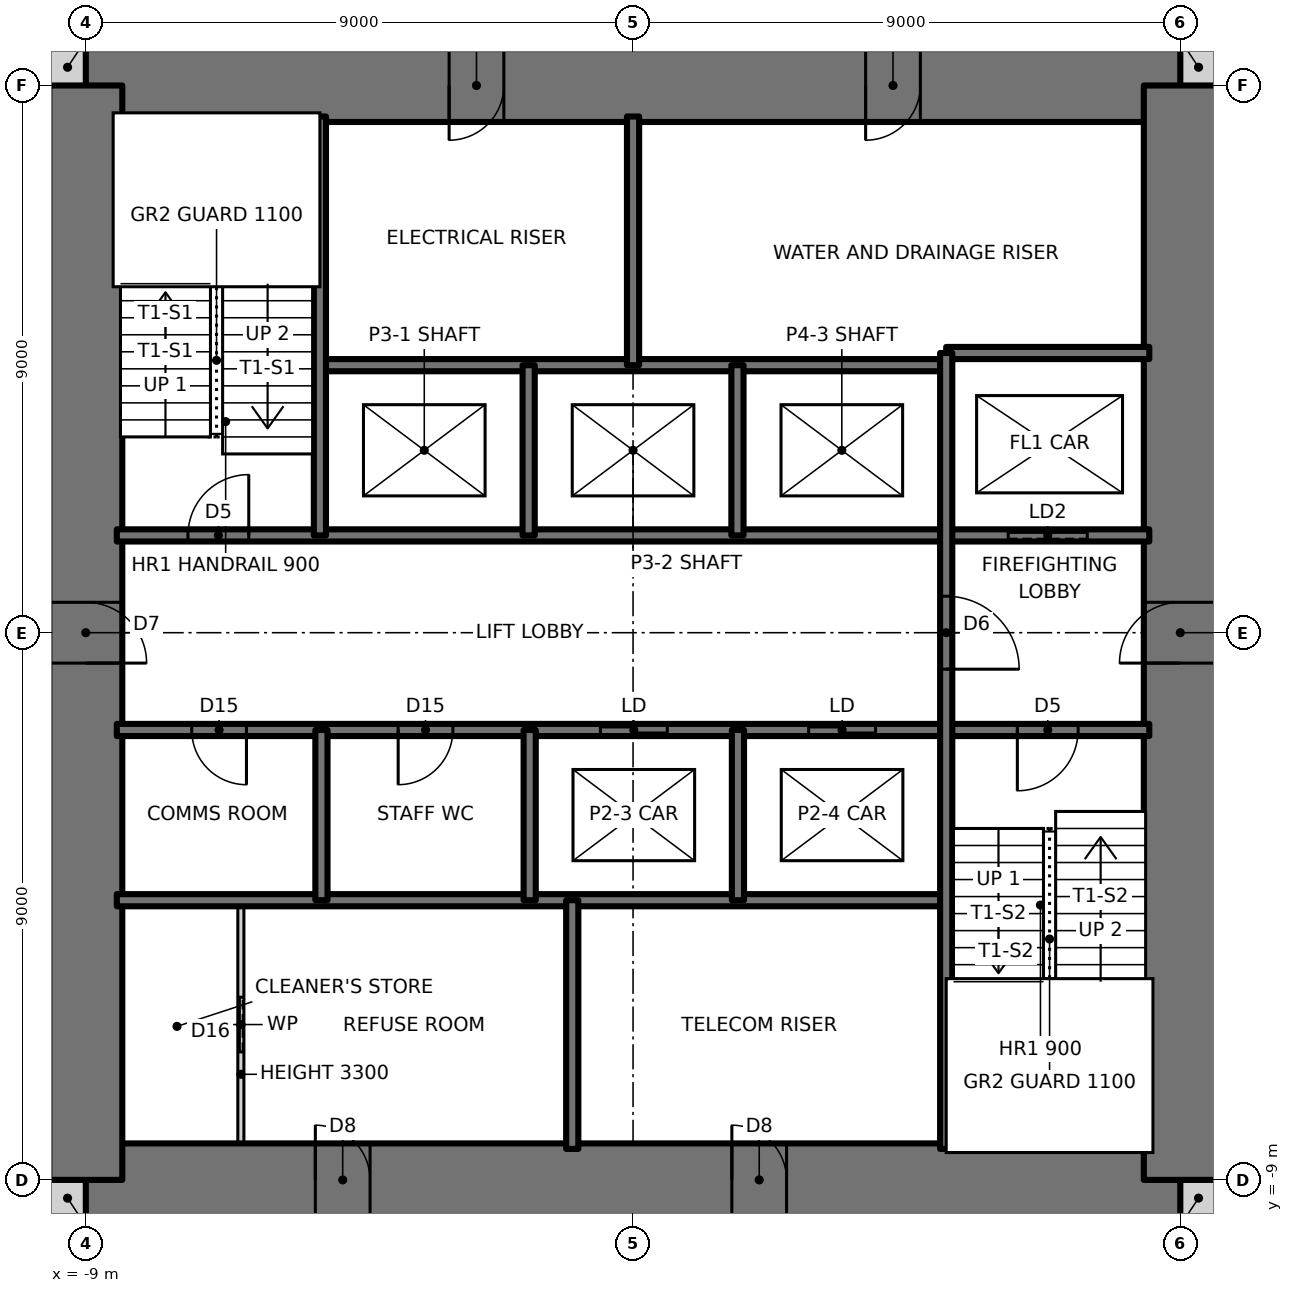
"""IFC4 building model, lengths in metres.
Left out: names, types, materials, properties, quantities, classifications, styles, units other than length and angle.
Written with IfcOpenShell. Run it as: python <this file> out.ifc"""

import sys

from ifc_helpers import new_model, si_unit, direction, frame, frame_2d, origin, place, context, subcontext, project, spatial, rectangle, extrude, element, fill, save


model = new_model("IFC4")
c1 = context("Model", 3, precision=1e-05, world=origin(), true_north=direction((0.0, 1.0)))
c2 = subcontext(c1, "Body", "Model", "MODEL_VIEW")
j1 = project(units=[si_unit("LENGTHUNIT", "METRE"), si_unit("PLANEANGLEUNIT", "RADIAN")], contexts=[c1])
p1 = place(None, origin())
s1 = spatial("IfcSite", under=j1, at=p1, CompositionType="ELEMENT")
p2 = place(p1, origin())
s2 = spatial("IfcBuilding", under=s1, at=p2, CompositionType="ELEMENT")
p3 = place(p2, frame((0.0, 0.0, 91.0)))
s3 = spatial("IfcBuildingStorey", under=s2, at=p3, CompositionType="ELEMENT", Elevation=91.0)
for number, where, z_axis, x_axis in (
    (1, (-9.6, -9.3, 0.0), (0.0, 0.0, 1.0), (1.0, 0.0, 0.0)),
    (2, (9.0, -9.3, 0.0), (0.0, 0.0, 1.0), (1.0, 0.0, 0.0)),
    (3, (9.0, 9.3, 0.0), (0.0, 0.0, 1.0), (1.0, 0.0, 0.0)),
    (4, (-9.6, 9.3, 0.0), (0.0, 0.0, 1.0), (1.0, 0.0, 0.0)),
):
    element("IfcWall", number, at=place(p3, frame(where, z_axis=z_axis, x_axis=x_axis)), inside=s3, PredefinedType="SOLIDWALL", context=c2, shape_type="SweptSolid", body=[
        extrude(rectangle(XDim=0.6, YDim=0.6, at=frame_2d((0.3, 0.0))), origin(), (0.0, 0.0, 1.0), 3.5),
    ])
p4 = place(p3, frame((-9.0, -9.0, 0.0), z_axis=(0.0, 0.0, 1.0), x_axis=(1.0, 0.0, 0.0)))
e5 = element("IfcWall", 5, at=p4, inside=s3, PredefinedType="SHEAR", context=c2, shape_type="SweptSolid", body=[
    extrude(rectangle(XDim=18.0, YDim=1.2, at=frame_2d((9.0, 0.0))), origin(), (0.0, 0.0, 1.0), 3.5),
])
p5 = place(p4, frame((3.775, 0.0, 0.0)))
e6 = element("IfcOpeningElement", 6, at=p5, cuts=e5, PredefinedType="OPENING", context=c2, shape_type="SweptSolid", body=[
    extrude(rectangle(XDim=0.9, YDim=2.1, at=frame_2d((0.45, 1.05))), frame((0.0, 0.61, 0.0), z_axis=(0.0, -1.0, 0.0), x_axis=(1.0, 0.0, 0.0)), (0.0, 0.0, 1.0), 1.22),
])
p6 = place(p4, frame((10.625, 0.0, 0.0)))
e7 = element("IfcOpeningElement", 7, at=p6, cuts=e5, PredefinedType="OPENING", context=c2, shape_type="SweptSolid", body=[
    extrude(rectangle(XDim=0.9, YDim=2.1, at=frame_2d((0.45, 1.05))), frame((0.0, 0.61, 0.0), z_axis=(0.0, -1.0, 0.0), x_axis=(1.0, 0.0, 0.0)), (0.0, 0.0, 1.0), 1.22),
])
p7 = place(p3, frame((9.0, 9.0, 0.0), z_axis=(0.0, 0.0, 1.0), x_axis=(-1.0, 0.0, 0.0)))
e8 = element("IfcWall", 8, at=p7, inside=s3, PredefinedType="SHEAR", context=c2, shape_type="SweptSolid", body=[
    extrude(rectangle(XDim=18.0, YDim=1.2, at=frame_2d((9.0, 0.0))), origin(), (0.0, 0.0, 1.0), 3.5),
])
p8 = place(p7, frame((11.125, 0.0, 0.0)))
e9 = element("IfcOpeningElement", 9, at=p8, cuts=e8, PredefinedType="OPENING", context=c2, shape_type="SweptSolid", body=[
    extrude(rectangle(XDim=0.9, YDim=2.1, at=frame_2d((0.45, 1.05))), frame((0.0, 0.61, 0.0), z_axis=(0.0, -1.0, 0.0), x_axis=(1.0, 0.0, 0.0)), (0.0, 0.0, 1.0), 1.22),
])
p9 = place(p7, frame((4.275, 0.0, 0.0)))
e10 = element("IfcOpeningElement", 10, at=p9, cuts=e8, PredefinedType="OPENING", context=c2, shape_type="SweptSolid", body=[
    extrude(rectangle(XDim=0.9, YDim=2.1, at=frame_2d((0.45, 1.05))), frame((0.0, 0.61, 0.0), z_axis=(0.0, -1.0, 0.0), x_axis=(1.0, 0.0, 0.0)), (0.0, 0.0, 1.0), 1.22),
])
p10 = place(p3, frame((9.0, -9.0, 0.0), z_axis=(0.0, 0.0, 1.0), x_axis=(0.0, 1.0, 0.0)))
e11 = element("IfcWall", 11, at=p10, inside=s3, PredefinedType="SHEAR", context=c2, shape_type="SweptSolid", body=[
    extrude(rectangle(XDim=18.0, YDim=1.2, at=frame_2d((9.0, 0.0))), origin(), (0.0, 0.0, 1.0), 3.5),
])
p11 = place(p10, frame((8.5, 0.0, 0.0)))
e12 = element("IfcOpeningElement", 12, at=p11, cuts=e11, PredefinedType="OPENING", context=c2, shape_type="SweptSolid", body=[
    extrude(rectangle(XDim=1.0, YDim=2.1, at=frame_2d((0.5, 1.05))), frame((0.0, 0.61, 0.0), z_axis=(0.0, -1.0, 0.0), x_axis=(1.0, 0.0, 0.0)), (0.0, 0.0, 1.0), 1.22),
])
p12 = place(p3, frame((-9.0, 9.0, 0.0), z_axis=(0.0, 0.0, 1.0), x_axis=(0.0, -1.0, 0.0)))
e13 = element("IfcWall", 13, at=p12, inside=s3, PredefinedType="SHEAR", context=c2, shape_type="SweptSolid", body=[
    extrude(rectangle(XDim=18.0, YDim=1.2, at=frame_2d((9.0, 0.0))), origin(), (0.0, 0.0, 1.0), 3.5),
])
p13 = place(p12, frame((8.5, 0.0, 0.0)))
e14 = element("IfcOpeningElement", 14, at=p13, cuts=e13, PredefinedType="OPENING", context=c2, shape_type="SweptSolid", body=[
    extrude(rectangle(XDim=1.0, YDim=2.1, at=frame_2d((0.5, 1.05))), frame((0.0, 0.61, 0.0), z_axis=(0.0, -1.0, 0.0), x_axis=(1.0, 0.0, 0.0)), (0.0, 0.0, 1.0), 1.22),
])
p14 = place(p3, frame((-8.49, -4.4, 0.0), z_axis=(0.0, 0.0, 1.0), x_axis=(1.0, 0.0, 0.0)))
e15 = element("IfcWall", 15, at=p14, inside=s3, PredefinedType="SOLIDWALL", context=c2, shape_type="SweptSolid", body=[
    extrude(rectangle(XDim=13.64, YDim=0.2, at=frame_2d((6.82, 0.0))), origin(), (0.0, 0.0, 1.0), 3.5),
])
p15 = place(p3, frame((-8.49, -1.6, 0.0), z_axis=(0.0, 0.0, 1.0), x_axis=(1.0, 0.0, 0.0)))
e16 = element("IfcWall", 16, at=p15, inside=s3, PredefinedType="SOLIDWALL", context=c2, shape_type="SweptSolid", body=[
    extrude(rectangle(XDim=16.98, YDim=0.2, at=frame_2d((8.49, 0.0))), origin(), (0.0, 0.0, 1.0), 3.5),
])
p16 = place(p15, frame((14.81, 0.0, 0.0)))
e17 = element("IfcOpeningElement", 17, at=p16, cuts=e16, PredefinedType="OPENING", context=c2, shape_type="SweptSolid", body=[
    extrude(rectangle(XDim=1.0, YDim=2.1, at=frame_2d((0.5, 1.05))), frame((0.0, 0.11, 0.0), z_axis=(0.0, -1.0, 0.0), x_axis=(1.0, 0.0, 0.0)), (0.0, 0.0, 1.0), 0.22),
])
p17 = place(p15, frame((1.232, 0.0, 0.0)))
e18 = element("IfcOpeningElement", 18, at=p17, cuts=e16, PredefinedType="OPENING", context=c2, shape_type="SweptSolid", body=[
    extrude(rectangle(XDim=0.9, YDim=2.1, at=frame_2d((0.45, 1.05))), frame((0.0, 0.11, 0.0), z_axis=(0.0, -1.0, 0.0), x_axis=(1.0, 0.0, 0.0)), (0.0, 0.0, 1.0), 0.22),
])
p18 = place(p15, frame((4.627, 0.0, 0.0)))
e19 = element("IfcOpeningElement", 19, at=p18, cuts=e16, PredefinedType="OPENING", context=c2, shape_type="SweptSolid", body=[
    extrude(rectangle(XDim=0.9, YDim=2.1, at=frame_2d((0.45, 1.05))), frame((0.0, 0.11, 0.0), z_axis=(0.0, -1.0, 0.0), x_axis=(1.0, 0.0, 0.0)), (0.0, 0.0, 1.0), 0.22),
])
p19 = place(p15, frame((7.953, 0.0, 0.0)))
e20 = element("IfcOpeningElement", 20, at=p19, cuts=e16, PredefinedType="OPENING", context=c2, shape_type="SweptSolid", body=[
    extrude(rectangle(XDim=1.1, YDim=2.1, at=frame_2d((0.55, 1.05))), frame((0.0, 0.11, 0.0), z_axis=(0.0, -1.0, 0.0), x_axis=(1.0, 0.0, 0.0)), (0.0, 0.0, 1.0), 0.22),
])
p20 = place(p15, frame((11.378, 0.0, 0.0)))
e21 = element("IfcOpeningElement", 21, at=p20, cuts=e16, PredefinedType="OPENING", context=c2, shape_type="SweptSolid", body=[
    extrude(rectangle(XDim=1.1, YDim=2.1, at=frame_2d((0.55, 1.05))), frame((0.0, 0.11, 0.0), z_axis=(0.0, -1.0, 0.0), x_axis=(1.0, 0.0, 0.0)), (0.0, 0.0, 1.0), 0.22),
])
p21 = place(p3, frame((-8.49, 1.6, 0.0), z_axis=(0.0, 0.0, 1.0), x_axis=(1.0, 0.0, 0.0)))
e22 = element("IfcWall", 22, at=p21, inside=s3, PredefinedType="SOLIDWALL", context=c2, shape_type="SweptSolid", body=[
    extrude(rectangle(XDim=16.98, YDim=0.2, at=frame_2d((8.49, 0.0))), origin(), (0.0, 0.0, 1.0), 3.5),
])
p22 = place(p21, frame((1.17, 0.0, 0.0)))
e23 = element("IfcOpeningElement", 23, at=p22, cuts=e22, PredefinedType="OPENING", context=c2, shape_type="SweptSolid", body=[
    extrude(rectangle(XDim=1.0, YDim=2.1, at=frame_2d((0.5, 1.05))), frame((0.0, 0.11, 0.0), z_axis=(0.0, -1.0, 0.0), x_axis=(1.0, 0.0, 0.0)), (0.0, 0.0, 1.0), 0.22),
])
p23 = place(p21, frame((14.66, 0.0, 0.0)))
e24 = element("IfcOpeningElement", 24, at=p23, cuts=e22, PredefinedType="OPENING", context=c2, shape_type="SweptSolid", body=[
    extrude(rectangle(XDim=1.3, YDim=2.1, at=frame_2d((0.65, 1.05))), frame((0.0, 0.11, 0.0), z_axis=(0.0, -1.0, 0.0), x_axis=(1.0, 0.0, 0.0)), (0.0, 0.0, 1.0), 0.22),
])
p24 = place(p3, frame((-5.15, 4.4, 0.0), z_axis=(0.0, 0.0, 1.0), x_axis=(1.0, 0.0, 0.0)))
e25 = element("IfcWall", 25, at=p24, inside=s3, PredefinedType="SOLIDWALL", context=c2, shape_type="SweptSolid", body=[
    extrude(rectangle(XDim=10.3, YDim=0.2, at=frame_2d((5.15, 0.0))), origin(), (0.0, 0.0, 1.0), 3.5),
])
p25 = place(p3, frame((5.15, 4.6, 0.0), z_axis=(0.0, 0.0, 1.0), x_axis=(1.0, 0.0, 0.0)))
e26 = element("IfcWall", 26, at=p25, inside=s3, PredefinedType="SOLIDWALL", context=c2, shape_type="SweptSolid", body=[
    extrude(rectangle(XDim=3.34, YDim=0.2, at=frame_2d((1.67, 0.0))), origin(), (0.0, 0.0, 1.0), 3.5),
])
p26 = place(p3, frame((5.15, -8.49, 0.0), z_axis=(0.0, 0.0, 1.0), x_axis=(0.0, 1.0, 0.0)))
e27 = element("IfcWall", 27, at=p26, inside=s3, PredefinedType="SOLIDWALL", context=c2, shape_type="SweptSolid", body=[
    extrude(rectangle(XDim=13.09, YDim=0.2, at=frame_2d((6.545, 0.0))), origin(), (0.0, 0.0, 1.0), 3.5),
])
p27 = place(p26, frame((7.89, 0.0, 0.0)))
e28 = element("IfcOpeningElement", 28, at=p27, cuts=e27, PredefinedType="OPENING", context=c2, shape_type="SweptSolid", body=[
    extrude(rectangle(XDim=1.2, YDim=2.1, at=frame_2d((0.6, 1.05))), frame((0.0, 0.11, 0.0), z_axis=(0.0, -1.0, 0.0), x_axis=(1.0, 0.0, 0.0)), (0.0, 0.0, 1.0), 0.22),
])
for number, where, z_axis, x_axis in (
    (29, (1.725, -4.4, 0.0), (0.0, 0.0, 1.0), (0.0, 1.0, 0.0)),
    (30, (1.717, 1.6, 0.0), (0.0, 0.0, 1.0), (0.0, 1.0, 0.0)),
):
    element("IfcWall", number, at=place(p3, frame(where, z_axis=z_axis, x_axis=x_axis)), inside=s3, PredefinedType="SOLIDWALL", context=c2, shape_type="SweptSolid", body=[
        extrude(rectangle(XDim=2.8, YDim=0.2, at=frame_2d((1.4, 0.0))), origin(), (0.0, 0.0, 1.0), 3.5),
    ])
for number, where, z_axis, x_axis in (
    (31, (0.0, 4.4, 0.0), (0.0, 0.0, 1.0), (0.0, 1.0, 0.0)),
    (32, (-1.0, -8.49, 0.0), (0.0, 0.0, 1.0), (0.0, 1.0, 0.0)),
):
    element("IfcWall", number, at=place(p3, frame(where, z_axis=z_axis, x_axis=x_axis)), inside=s3, PredefinedType="SOLIDWALL", context=c2, shape_type="SweptSolid", body=[
        extrude(rectangle(XDim=4.09, YDim=0.2, at=frame_2d((2.045, 0.0))), origin(), (0.0, 0.0, 1.0), 3.5),
    ])
for number, where, z_axis, x_axis in (
    (33, (-1.7, -4.4, 0.0), (0.0, 0.0, 1.0), (0.0, 1.0, 0.0)),
    (34, (-1.717, 1.6, 0.0), (0.0, 0.0, 1.0), (0.0, 1.0, 0.0)),
    (35, (-5.125, -4.4, 0.0), (0.0, 0.0, 1.0), (0.0, 1.0, 0.0)),
):
    element("IfcWall", number, at=place(p3, frame(where, z_axis=z_axis, x_axis=x_axis)), inside=s3, PredefinedType="SOLIDWALL", context=c2, shape_type="SweptSolid", body=[
        extrude(rectangle(XDim=2.8, YDim=0.2, at=frame_2d((1.4, 0.0))), origin(), (0.0, 0.0, 1.0), 3.5),
    ])
p28 = place(p3, frame((-5.15, 1.6, 0.0), z_axis=(0.0, 0.0, 1.0), x_axis=(0.0, 1.0, 0.0)))
e36 = element("IfcWall", 36, at=p28, inside=s3, PredefinedType="SOLIDWALL", context=c2, shape_type="SweptSolid", body=[
    extrude(rectangle(XDim=6.89, YDim=0.2, at=frame_2d((3.445, 0.0))), origin(), (0.0, 0.0, 1.0), 3.5),
])
p29 = place(p3, frame((-6.45, -8.49, 0.0), z_axis=(0.0, 0.0, 1.0), x_axis=(0.0, 1.0, 0.0)))
e37 = element("IfcWall", 37, at=p29, inside=s3, PredefinedType="PARTITIONING", context=c2, shape_type="SweptSolid", body=[
    extrude(rectangle(XDim=4.09, YDim=0.1, at=frame_2d((2.045, 0.0))), origin(), (0.0, 0.0, 1.0), 3.3),
])
p30 = place(p29, frame((1.595, 0.0, 0.0)))
e38 = element("IfcOpeningElement", 38, at=p30, cuts=e37, PredefinedType="OPENING", context=c2, shape_type="SweptSolid", body=[
    extrude(rectangle(XDim=0.9, YDim=2.1, at=frame_2d((0.45, 1.05))), frame((0.0, 0.06, 0.0), z_axis=(0.0, -1.0, 0.0), x_axis=(1.0, 0.0, 0.0)), (0.0, 0.0, 1.0), 0.12),
])
p31 = place(p22, origin())
e39 = element("IfcDoor", 39, at=p31, inside=s3, OperationType="SINGLE_SWING_RIGHT", PredefinedType="DOOR", context=c2, shape_type="SweptSolid", body=[
    extrude(rectangle(XDim=1.0, YDim=2.1, at=frame_2d((0.5, 1.05))), frame((0.0, 0.025, 0.0), z_axis=(0.0, -1.0, 0.0), x_axis=(1.0, 0.0, 0.0)), (0.0, 0.0, 1.0), 0.05),
])
fill(e23, e39)
p32 = place(p16, frame((1.0, 0.0, 0.0), z_axis=(0.0, 0.0, 1.0), x_axis=(-1.0, 0.0, 0.0)))
e40 = element("IfcDoor", 40, at=p32, inside=s3, OperationType="SINGLE_SWING_RIGHT", PredefinedType="DOOR", context=c2, shape_type="SweptSolid", body=[
    extrude(rectangle(XDim=1.0, YDim=2.1, at=frame_2d((0.5, 1.05))), frame((0.0, 0.025, 0.0), z_axis=(0.0, -1.0, 0.0), x_axis=(1.0, 0.0, 0.0)), (0.0, 0.0, 1.0), 0.05),
])
fill(e17, e40)
p33 = place(p27, frame((1.2, 0.0, 0.0), z_axis=(0.0, 0.0, 1.0), x_axis=(-1.0, 0.0, 0.0)))
e41 = element("IfcDoor", 41, at=p33, inside=s3, OperationType="SINGLE_SWING_RIGHT", PredefinedType="DOOR", context=c2, shape_type="SweptSolid", body=[
    extrude(rectangle(XDim=1.2, YDim=2.1, at=frame_2d((0.6, 1.05))), frame((0.0, 0.025, 0.0), z_axis=(0.0, -1.0, 0.0), x_axis=(1.0, 0.0, 0.0)), (0.0, 0.0, 1.0), 0.05),
])
fill(e28, e41)
p34 = place(p17, frame((0.9, 0.0, 0.0), z_axis=(0.0, 0.0, 1.0), x_axis=(-1.0, 0.0, 0.0)))
e42 = element("IfcDoor", 42, at=p34, inside=s3, OperationType="SINGLE_SWING_LEFT", PredefinedType="DOOR", context=c2, shape_type="SweptSolid", body=[
    extrude(rectangle(XDim=0.9, YDim=2.1, at=frame_2d((0.45, 1.05))), frame((0.0, 0.025, 0.0), z_axis=(0.0, -1.0, 0.0), x_axis=(1.0, 0.0, 0.0)), (0.0, 0.0, 1.0), 0.05),
])
fill(e18, e42)
p35 = place(p18, frame((0.9, 0.0, 0.0), z_axis=(0.0, 0.0, 1.0), x_axis=(-1.0, 0.0, 0.0)))
e43 = element("IfcDoor", 43, at=p35, inside=s3, OperationType="SINGLE_SWING_RIGHT", PredefinedType="DOOR", context=c2, shape_type="SweptSolid", body=[
    extrude(rectangle(XDim=0.9, YDim=2.1, at=frame_2d((0.45, 1.05))), frame((0.0, 0.025, 0.0), z_axis=(0.0, -1.0, 0.0), x_axis=(1.0, 0.0, 0.0)), (0.0, 0.0, 1.0), 0.05),
])
fill(e19, e43)
p36 = place(p30, origin())
e44 = element("IfcDoor", 44, at=p36, inside=s3, OperationType="SLIDING_TO_LEFT", PredefinedType="DOOR", context=c2, shape_type="SweptSolid", body=[
    extrude(rectangle(XDim=0.9, YDim=2.1, at=frame_2d((0.45, 1.05))), frame((0.0, 0.025, 0.0), z_axis=(0.0, -1.0, 0.0), x_axis=(1.0, 0.0, 0.0)), (0.0, 0.0, 1.0), 0.05),
])
fill(e38, e44)
p37 = place(p13, origin())
e45 = element("IfcDoor", 45, at=p37, inside=s3, OperationType="SINGLE_SWING_RIGHT", PredefinedType="DOOR", context=c2, shape_type="SweptSolid", body=[
    extrude(rectangle(XDim=1.0, YDim=2.1, at=frame_2d((0.5, 1.05))), frame((0.0, 0.025, 0.0), z_axis=(0.0, -1.0, 0.0), x_axis=(1.0, 0.0, 0.0)), (0.0, 0.0, 1.0), 0.05),
])
fill(e14, e45)
p38 = place(p11, origin())
e46 = element("IfcDoor", 46, at=p38, inside=s3, OperationType="SINGLE_SWING_LEFT", PredefinedType="DOOR", context=c2, shape_type="SweptSolid", body=[
    extrude(rectangle(XDim=1.0, YDim=2.1, at=frame_2d((0.5, 1.05))), frame((0.0, 0.025, 0.0), z_axis=(0.0, -1.0, 0.0), x_axis=(1.0, 0.0, 0.0)), (0.0, 0.0, 1.0), 0.05),
])
fill(e12, e46)
p39 = place(p8, origin())
e47 = element("IfcDoor", 47, at=p39, inside=s3, OperationType="SINGLE_SWING_RIGHT", PredefinedType="DOOR", context=c2, shape_type="SweptSolid", body=[
    extrude(rectangle(XDim=0.9, YDim=2.1, at=frame_2d((0.45, 1.05))), frame((0.0, 0.025, 0.0), z_axis=(0.0, -1.0, 0.0), x_axis=(1.0, 0.0, 0.0)), (0.0, 0.0, 1.0), 0.05),
])
fill(e9, e47)
p40 = place(p9, origin())
e48 = element("IfcDoor", 48, at=p40, inside=s3, OperationType="SINGLE_SWING_RIGHT", PredefinedType="DOOR", context=c2, shape_type="SweptSolid", body=[
    extrude(rectangle(XDim=0.9, YDim=2.1, at=frame_2d((0.45, 1.05))), frame((0.0, 0.025, 0.0), z_axis=(0.0, -1.0, 0.0), x_axis=(1.0, 0.0, 0.0)), (0.0, 0.0, 1.0), 0.05),
])
fill(e10, e48)
p41 = place(p5, origin())
e49 = element("IfcDoor", 49, at=p41, inside=s3, OperationType="SINGLE_SWING_LEFT", PredefinedType="DOOR", context=c2, shape_type="SweptSolid", body=[
    extrude(rectangle(XDim=0.9, YDim=2.1, at=frame_2d((0.45, 1.05))), frame((0.0, 0.025, 0.0), z_axis=(0.0, -1.0, 0.0), x_axis=(1.0, 0.0, 0.0)), (0.0, 0.0, 1.0), 0.05),
])
fill(e6, e49)
p42 = place(p6, origin())
e50 = element("IfcDoor", 50, at=p42, inside=s3, OperationType="SINGLE_SWING_LEFT", PredefinedType="DOOR", context=c2, shape_type="SweptSolid", body=[
    extrude(rectangle(XDim=0.9, YDim=2.1, at=frame_2d((0.45, 1.05))), frame((0.0, 0.025, 0.0), z_axis=(0.0, -1.0, 0.0), x_axis=(1.0, 0.0, 0.0)), (0.0, 0.0, 1.0), 0.05),
])
fill(e7, e50)
p43 = place(p19, origin())
e51 = element("IfcDoor", 51, at=p43, inside=s3, OperationType="DOUBLE_DOOR_SLIDING", PredefinedType="DOOR", context=c2, shape_type="SweptSolid", body=[
    extrude(rectangle(XDim=1.1, YDim=2.1, at=frame_2d((0.55, 1.05))), frame((0.0, 0.025, 0.0), z_axis=(0.0, -1.0, 0.0), x_axis=(1.0, 0.0, 0.0)), (0.0, 0.0, 1.0), 0.05),
])
fill(e20, e51)
p44 = place(p20, origin())
e52 = element("IfcDoor", 52, at=p44, inside=s3, OperationType="DOUBLE_DOOR_SLIDING", PredefinedType="DOOR", context=c2, shape_type="SweptSolid", body=[
    extrude(rectangle(XDim=1.1, YDim=2.1, at=frame_2d((0.55, 1.05))), frame((0.0, 0.025, 0.0), z_axis=(0.0, -1.0, 0.0), x_axis=(1.0, 0.0, 0.0)), (0.0, 0.0, 1.0), 0.05),
])
fill(e21, e52)
p45 = place(p23, origin())
e53 = element("IfcDoor", 53, at=p45, inside=s3, OperationType="SLIDING_TO_LEFT", PredefinedType="DOOR", context=c2, shape_type="SweptSolid", body=[
    extrude(rectangle(XDim=1.3, YDim=2.1, at=frame_2d((0.65, 1.05))), frame((0.0, 0.025, 0.0), z_axis=(0.0, -1.0, 0.0), x_axis=(1.0, 0.0, 0.0)), (0.0, 0.0, 1.0), 0.05),
])
fill(e24, e53)
save(model, sys.argv[1])
